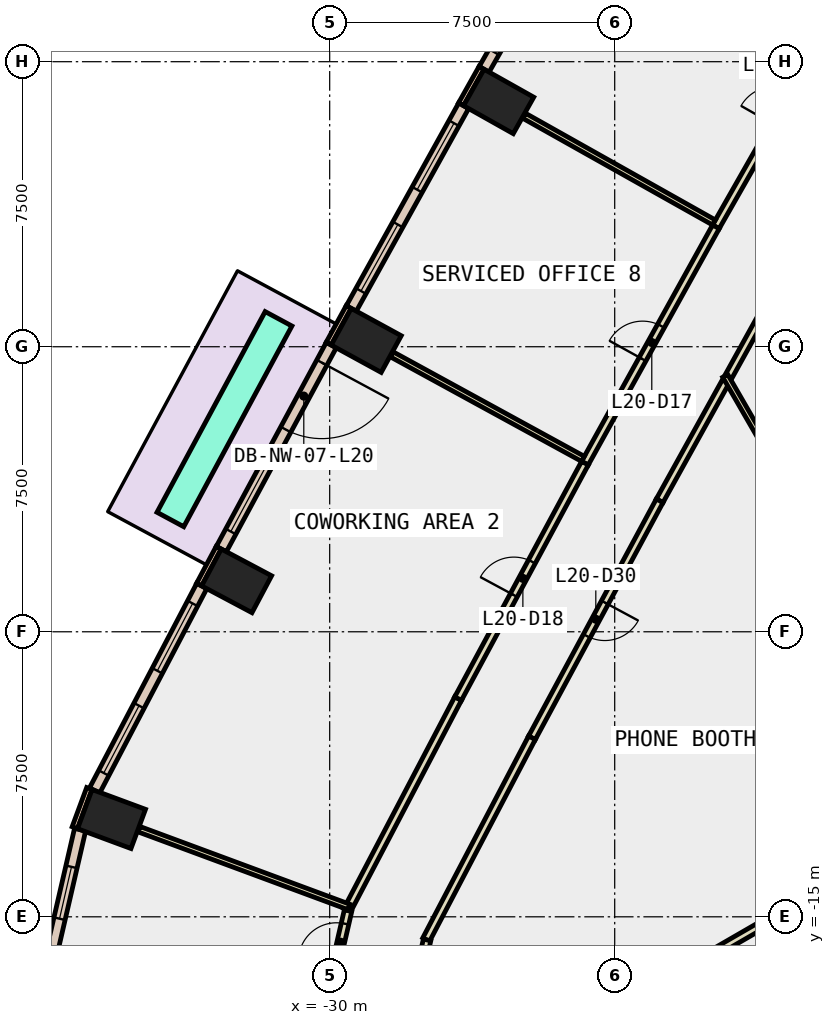
"""IFC4 building model, lengths in metres.
Left out: names, types, materials, properties, quantities, classifications, styles, units other than length and angle.
Written with IfcOpenShell. Run it as: python <this file> out.ifc"""

import sys

from ifc_helpers import new_model, si_unit, direction, frame, frame_2d, origin, origin_2d, place, context, subcontext, project, spatial, rectangle, extrude, element, fill, save


model = new_model("IFC4")
c1 = context("Model", 3, precision=1e-05, world=origin(), true_north=direction((0.0, 1.0)))
c2 = subcontext(c1, "Body", "Model", "MODEL_VIEW")
j1 = project(units=[si_unit("LENGTHUNIT", "METRE"), si_unit("PLANEANGLEUNIT", "RADIAN")], contexts=[c1])
p1 = place(None, origin())
s1 = spatial("IfcSite", under=j1, at=p1, CompositionType="ELEMENT")
p2 = place(p1, origin())
s2 = spatial("IfcBuilding", under=s1, at=p2, CompositionType="ELEMENT")
p3 = place(p2, frame((0.0, 0.0, 95.0)))
s3 = spatial("IfcBuildingStorey", under=s2, at=p3, CompositionType="ELEMENT", Elevation=95.0)
for number, where, z_axis, x_axis in (
    (1, (-25.554, 6.454, -0.4), (0.0, 0.0, 1.0), (0.49, 0.872, 0.0)),
    (2, (-29.039, 0.167, -0.4), (0.0, 0.0, 1.0), (0.48, 0.877, 0.0)),
    (3, (-32.449, -6.16, -0.4), (0.0, 0.0, 1.0), (0.469, 0.883, 0.0)),
    (4, (-35.741, -12.427, -0.4), (0.0, 0.0, 1.0), (0.347, 0.938, 0.0)),
):
    element("IfcColumn", number, at=place(p3, frame(where, z_axis=z_axis, x_axis=x_axis)), inside=s3, PredefinedType="COLUMN", context=c2, shape_type="SweptSolid", body=[
        extrude(rectangle(XDim=1.1, YDim=1.5, at=origin_2d()), origin(), (0.0, 0.0, 1.0), 4.2),
    ])
p4 = place(p3, frame((-26.004, 7.338, 0.0), z_axis=(0.0, 0.0, 1.0), x_axis=(-0.490008344094, -0.871717742574, 0.0)))
e5 = element("IfcWall", 5, at=p4, inside=s3, PredefinedType="STANDARD", context=c2, shape_type="SweptSolid", body=[
    extrude(rectangle(XDim=1.1, YDim=0.15, at=frame_2d((0.55, 0.0))), origin(), (0.0, 0.0, 1.0), 3.8),
])
p5 = place(p3, frame((-29.499, 1.046, 0.0), z_axis=(0.0, 0.0, 1.0), x_axis=(-0.479737645119, -0.877411985247, 0.0)))
e6 = element("IfcWall", 6, at=p5, inside=s3, PredefinedType="STANDARD", context=c2, shape_type="SweptSolid", body=[
    extrude(rectangle(XDim=1.101, YDim=0.15, at=frame_2d((0.55, 0.0))), origin(), (0.0, 0.0, 1.0), 3.8),
])
p6 = place(p3, frame((-32.92, -5.288, 0.0), z_axis=(0.0, 0.0, 1.0), x_axis=(-0.469366248657, -0.883003581319, 0.0)))
e7 = element("IfcWall", 7, at=p6, inside=s3, PredefinedType="STANDARD", context=c2, shape_type="SweptSolid", body=[
    extrude(rectangle(XDim=1.1, YDim=0.15, at=frame_2d((0.55, 0.0))), origin(), (0.0, 0.0, 1.0), 3.8),
])
p7 = place(p3, frame((-36.324, -11.624, 0.0), z_axis=(0.0, 0.0, 1.0), x_axis=(-0.347205967468, -0.937788897436, 0.0)))
e8 = element("IfcWall", 8, at=p7, inside=s3, PredefinedType="STANDARD", context=c2, shape_type="SweptSolid", body=[
    extrude(rectangle(XDim=1.1, YDim=0.15, at=frame_2d((0.55, 0.0))), origin(), (0.0, 0.0, 1.0), 3.8),
])
p8 = place(p3, frame((-22.918, 12.598, 0.0), z_axis=(0.0, 0.0, 1.0), x_axis=(-0.49492259535, -0.868937065967, 0.0)))
e9 = element("IfcWall", 9, at=p8, inside=s3, PredefinedType="STANDARD", context=c2, shape_type="SweptSolid", body=[
    extrude(rectangle(XDim=6.098, YDim=0.3, at=frame_2d((3.049, 0.0))), origin(), (0.0, 0.0, 1.0), 3.8),
])
p9 = place(p8, frame((0.525, 0.0, 0.9)))
e10 = element("IfcOpeningElement", 10, at=p9, cuts=e9, PredefinedType="OPENING", context=c2, shape_type="SweptSolid", body=[
    extrude(rectangle(XDim=2.0, YDim=2.6, at=frame_2d((1.0, 1.3))), frame((0.0, 0.16, 0.0), z_axis=(0.0, -1.0, 0.0), x_axis=(1.0, 0.0, 0.0)), (0.0, 0.0, 1.0), 0.32),
])
p10 = place(p8, frame((3.574, 0.0, 0.9)))
e11 = element("IfcOpeningElement", 11, at=p10, cuts=e9, PredefinedType="OPENING", context=c2, shape_type="SweptSolid", body=[
    extrude(rectangle(XDim=2.0, YDim=2.6, at=frame_2d((1.0, 1.3))), frame((0.0, 0.16, 0.0), z_axis=(0.0, -1.0, 0.0), x_axis=(1.0, 0.0, 0.0)), (0.0, 0.0, 1.0), 0.32),
])
p11 = place(p3, frame((-26.474, 6.341, 0.0), z_axis=(0.0, 0.0, 1.0), x_axis=(-0.484823579315, -0.874611969356, 0.0)))
e12 = element("IfcWall", 12, at=p11, inside=s3, PredefinedType="STANDARD", context=c2, shape_type="SweptSolid", body=[
    extrude(rectangle(XDim=6.099, YDim=0.3, at=frame_2d((3.049, 0.0))), origin(), (0.0, 0.0, 1.0), 3.8),
])
p12 = place(p11, frame((0.525, 0.0, 0.9)))
e13 = element("IfcOpeningElement", 13, at=p12, cuts=e12, PredefinedType="OPENING", context=c2, shape_type="SweptSolid", body=[
    extrude(rectangle(XDim=2.0, YDim=2.6, at=frame_2d((1.0, 1.3))), frame((0.0, 0.16, 0.0), z_axis=(0.0, -1.0, 0.0), x_axis=(1.0, 0.0, 0.0)), (0.0, 0.0, 1.0), 0.32),
])
p13 = place(p11, frame((3.574, 0.0, 0.9)))
e14 = element("IfcOpeningElement", 14, at=p13, cuts=e12, PredefinedType="OPENING", context=c2, shape_type="SweptSolid", body=[
    extrude(rectangle(XDim=2.0, YDim=2.6, at=frame_2d((1.0, 1.3))), frame((0.0, 0.16, 0.0), z_axis=(0.0, -1.0, 0.0), x_axis=(1.0, 0.0, 0.0)), (0.0, 0.0, 1.0), 0.32),
])
p14 = place(p3, frame((-29.958, 0.044, 0.0), z_axis=(0.0, 0.0, 1.0), x_axis=(-0.474369552216, -0.880325807829, 0.0)))
e15 = element("IfcWall", 15, at=p14, inside=s3, PredefinedType="STANDARD", context=c2, shape_type="SweptSolid", body=[
    extrude(rectangle(XDim=6.099, YDim=0.3, at=frame_2d((3.049, 0.0))), origin(), (0.0, 0.0, 1.0), 3.8),
])
p15 = place(p14, frame((0.525, 0.0, 0.0)))
e16 = element("IfcOpeningElement", 16, at=p15, cuts=e15, PredefinedType="OPENING", context=c2, shape_type="SweptSolid", body=[
    extrude(rectangle(XDim=2.0, YDim=2.4, at=frame_2d((1.0, 1.2))), frame((0.0, 0.16, 0.0), z_axis=(0.0, -1.0, 0.0), x_axis=(1.0, 0.0, 0.0)), (0.0, 0.0, 1.0), 0.32),
])
p16 = place(p14, frame((3.574, 0.0, 0.9)))
e17 = element("IfcOpeningElement", 17, at=p16, cuts=e15, PredefinedType="OPENING", context=c2, shape_type="SweptSolid", body=[
    extrude(rectangle(XDim=2.0, YDim=2.6, at=frame_2d((1.0, 1.3))), frame((0.0, 0.16, 0.0), z_axis=(0.0, -1.0, 0.0), x_axis=(1.0, 0.0, 0.0)), (0.0, 0.0, 1.0), 0.32),
])
p17 = place(p3, frame((-33.366, -6.295, 0.0), z_axis=(0.0, 0.0, 1.0), x_axis=(-0.464187178015, -0.885737130173, 0.0)))
e18 = element("IfcWall", 18, at=p17, inside=s3, PredefinedType="STANDARD", context=c2, shape_type="SweptSolid", body=[
    extrude(rectangle(XDim=6.075, YDim=0.3, at=frame_2d((3.038, 0.0))), origin(), (0.0, 0.0, 1.0), 3.8),
])
p18 = place(p17, frame((0.519, 0.0, 0.9)))
e19 = element("IfcOpeningElement", 19, at=p18, cuts=e18, PredefinedType="OPENING", context=c2, shape_type="SweptSolid", body=[
    extrude(rectangle(XDim=2.0, YDim=2.6, at=frame_2d((1.0, 1.3))), frame((0.0, 0.16, 0.0), z_axis=(0.0, -1.0, 0.0), x_axis=(1.0, 0.0, 0.0)), (0.0, 0.0, 1.0), 0.32),
])
p19 = place(p17, frame((3.556, 0.0, 0.9)))
e20 = element("IfcOpeningElement", 20, at=p19, cuts=e18, PredefinedType="OPENING", context=c2, shape_type="SweptSolid", body=[
    extrude(rectangle(XDim=2.0, YDim=2.6, at=frame_2d((1.0, 1.3))), frame((0.0, 0.16, 0.0), z_axis=(0.0, -1.0, 0.0), x_axis=(1.0, 0.0, 0.0)), (0.0, 0.0, 1.0), 0.32),
])
p20 = place(p3, frame((-36.568, -12.706, 0.0), z_axis=(0.0, 0.0, 1.0), x_axis=(-0.224859506699, -0.974391195695, 0.0)))
e21 = element("IfcWall", 21, at=p20, inside=s3, PredefinedType="STANDARD", context=c2, shape_type="SweptSolid", body=[
    extrude(rectangle(XDim=3.41, YDim=0.3, at=frame_2d((1.705, 0.0))), origin(), (0.0, 0.0, 1.0), 3.8),
])
p21 = place(p20, frame((1.005, 0.0, 0.9)))
e22 = element("IfcOpeningElement", 22, at=p21, cuts=e21, PredefinedType="OPENING", context=c2, shape_type="SweptSolid", body=[
    extrude(rectangle(XDim=1.4, YDim=2.6, at=frame_2d((0.7, 1.3))), frame((0.0, 0.16, 0.0), z_axis=(0.0, -1.0, 0.0), x_axis=(1.0, 0.0, 0.0)), (0.0, 0.0, 1.0), 0.32),
])
p22 = place(p3, frame((-31.346, 0.735, 0.0), z_axis=(0.0, 0.0, 1.0), x_axis=(-0.474400726458, -0.880309008665, 0.0)))
e23 = element("IfcWall", 23, at=p22, inside=s3, PredefinedType="STANDARD", context=c2, shape_type="SweptSolid", body=[
    extrude(rectangle(XDim=5.999, YDim=0.8, at=frame_2d((3.0, 0.0))), origin(), (0.0, 0.0, 1.0), 0.8),
])
p23 = place(p3, frame((-17.883, 2.143, 0.0), z_axis=(0.0, 0.0, 1.0), x_axis=(-0.484695523805, -0.874682942101, 0.0)))
e24 = element("IfcWall", 24, at=p23, inside=s3, PredefinedType="PARTITIONING", context=c2, shape_type="SweptSolid", body=[
    extrude(rectangle(XDim=3.349, YDim=0.2, at=frame_2d((1.674, 0.0))), origin(), (0.0, 0.0, 1.0), 3.8),
])
p24 = place(p3, frame((-19.579, -0.917, 0.0), z_axis=(0.0, 0.0, 1.0), x_axis=(-0.484700239797, -0.874680328772, 0.0)))
e25 = element("IfcWall", 25, at=p24, inside=s3, PredefinedType="PARTITIONING", context=c2, shape_type="SweptSolid", body=[
    extrude(rectangle(XDim=3.585, YDim=0.2, at=frame_2d((1.792, 0.0))), origin(), (0.0, 0.0, 1.0), 3.8),
])
p25 = place(p3, frame((-21.317, -4.053, 0.0), z_axis=(0.0, 0.0, 1.0), x_axis=(-0.474391588657, -0.880313932987, 0.0)))
e26 = element("IfcWall", 26, at=p25, inside=s3, PredefinedType="PARTITIONING", context=c2, shape_type="SweptSolid", body=[
    extrude(rectangle(XDim=7.085, YDim=0.2, at=frame_2d((3.542, 0.0))), origin(), (0.0, 0.0, 1.0), 3.8),
])
p26 = place(p25, frame((3.042, 0.0, 0.0)))
e27 = element("IfcOpeningElement", 27, at=p26, cuts=e26, PredefinedType="OPENING", context=c2, shape_type="SweptSolid", body=[
    extrude(rectangle(XDim=1.0, YDim=2.1, at=frame_2d((0.5, 1.05))), frame((0.0, 0.11, 0.0), z_axis=(0.0, -1.0, 0.0), x_axis=(1.0, 0.0, 0.0)), (0.0, 0.0, 1.0), 0.22),
])
p27 = place(p3, frame((-24.678, -10.29, 0.0), z_axis=(0.0, 0.0, 1.0), x_axis=(-0.464203280494, -0.885728691179, 0.0)))
e28 = element("IfcWall", 28, at=p27, inside=s3, PredefinedType="PARTITIONING", context=c2, shape_type="SweptSolid", body=[
    extrude(rectangle(XDim=5.995, YDim=0.2, at=frame_2d((2.998, 0.0))), origin(), (0.0, 0.0, 1.0), 3.8),
])
p28 = place(p3, frame((-27.437, -15.609, 0.0), z_axis=(0.0, 0.0, 1.0), x_axis=(-0.224098195188, -0.97456656977, 0.0)))
e29 = element("IfcWall", 29, at=p28, inside=s3, PredefinedType="PARTITIONING", context=c2, shape_type="SweptSolid", body=[
    extrude(rectangle(XDim=0.375, YDim=0.2, at=frame_2d((0.188, 0.0))), origin(), (0.0, 0.0, 1.0), 3.8),
])
p29 = place(p3, frame((-19.838, 3.156, 0.0), z_axis=(0.0, 0.0, 1.0), x_axis=(0.494978648769, 0.868905137091, 0.0)))
e30 = element("IfcWall", 30, at=p29, inside=s3, PredefinedType="PARTITIONING", context=c2, shape_type="SweptSolid", body=[
    extrude(rectangle(XDim=7.186, YDim=0.2, at=frame_2d((3.593, 0.0))), origin(), (0.0, 0.0, 1.0), 3.8),
])
p30 = place(p29, frame((3.093, 0.0, 0.0)))
e31 = element("IfcOpeningElement", 31, at=p30, cuts=e30, PredefinedType="OPENING", context=c2, shape_type="SweptSolid", body=[
    extrude(rectangle(XDim=1.0, YDim=2.1, at=frame_2d((0.5, 1.05))), frame((0.0, 0.11, 0.0), z_axis=(0.0, -1.0, 0.0), x_axis=(1.0, 0.0, 0.0)), (0.0, 0.0, 1.0), 0.22),
])
p31 = place(p3, frame((-23.284, -3.064, 0.0), z_axis=(0.0, 0.0, 1.0), x_axis=(0.48478560119, 0.874633020689, 0.0)))
e32 = element("IfcWall", 32, at=p31, inside=s3, PredefinedType="PARTITIONING", context=c2, shape_type="SweptSolid", body=[
    extrude(rectangle(XDim=7.11, YDim=0.2, at=frame_2d((3.555, 0.0))), origin(), (0.0, 0.0, 1.0), 3.8),
])
p32 = place(p31, frame((3.13, 0.0, 0.0)))
e33 = element("IfcOpeningElement", 33, at=p32, cuts=e32, PredefinedType="OPENING", context=c2, shape_type="SweptSolid", body=[
    extrude(rectangle(XDim=1.0, YDim=2.1, at=frame_2d((0.5, 1.05))), frame((0.0, 0.11, 0.0), z_axis=(0.0, -1.0, 0.0), x_axis=(1.0, 0.0, 0.0)), (0.0, 0.0, 1.0), 0.22),
])
p33 = place(p3, frame((-29.541, -14.829, 0.0), z_axis=(0.0, 0.0, 1.0), x_axis=(0.46422598759, 0.885716790202, 0.0)))
e34 = element("IfcWall", 34, at=p33, inside=s3, PredefinedType="PARTITIONING", context=c2, shape_type="SweptSolid", body=[
    extrude(rectangle(XDim=6.29, YDim=0.2, at=frame_2d((3.145, 0.0))), origin(), (0.0, 0.0, 1.0), 3.8),
])
p34 = place(p3, frame((-26.621, -9.258, 0.0), z_axis=(0.0, 0.0, 1.0), x_axis=(0.474414295505, 0.880301696136, 0.0)))
e35 = element("IfcWall", 35, at=p34, inside=s3, PredefinedType="PARTITIONING", context=c2, shape_type="SweptSolid", body=[
    extrude(rectangle(XDim=7.036, YDim=0.2, at=frame_2d((3.518, 0.0))), origin(), (0.0, 0.0, 1.0), 3.8),
])
p35 = place(p34, frame((3.093, 0.0, 0.0)))
e36 = element("IfcOpeningElement", 36, at=p35, cuts=e35, PredefinedType="OPENING", context=c2, shape_type="SweptSolid", body=[
    extrude(rectangle(XDim=1.0, YDim=2.1, at=frame_2d((0.5, 1.05))), frame((0.0, 0.11, 0.0), z_axis=(0.0, -1.0, 0.0), x_axis=(1.0, 0.0, 0.0)), (0.0, 0.0, 1.0), 0.22),
])
p36 = place(p3, frame((-29.9, -16.501, 0.0), z_axis=(0.0, 0.0, 1.0), x_axis=(0.224316169854, 0.974516421587, 0.0)))
e37 = element("IfcWall", 37, at=p36, inside=s3, PredefinedType="PARTITIONING", context=c2, shape_type="SweptSolid", body=[
    extrude(rectangle(XDim=1.707, YDim=0.2, at=frame_2d((0.853, 0.0))), origin(), (0.0, 0.0, 1.0), 3.8),
])
p37 = place(p36, frame((0.353, 0.0, 0.0)))
e38 = element("IfcOpeningElement", 38, at=p37, cuts=e37, PredefinedType="OPENING", context=c2, shape_type="SweptSolid", body=[
    extrude(rectangle(XDim=1.0, YDim=2.1, at=frame_2d((0.5, 1.05))), frame((0.0, 0.11, 0.0), z_axis=(0.0, -1.0, 0.0), x_axis=(1.0, 0.0, 0.0)), (0.0, 0.0, 1.0), 0.22),
])
p38 = place(p3, frame((-13.072, -12.009, 0.0), z_axis=(0.0, 0.0, 1.0), x_axis=(-0.865993734772, -0.500054848326, 0.0)))
e39 = element("IfcWall", 39, at=p38, inside=s3, PredefinedType="PARTITIONING", context=c2, shape_type="SweptSolid", body=[
    extrude(rectangle(XDim=8.583, YDim=0.2, at=frame_2d((4.292, 0.0))), origin(), (0.0, 0.0, 1.0), 3.8),
])
p39 = place(p3, frame((-19.888, 3.27, 0.0), z_axis=(0.0, 0.0, 1.0), x_axis=(-0.871789386467, 0.489880868828, 0.0)))
e40 = element("IfcWall", 40, at=p39, inside=s3, PredefinedType="PARTITIONING", context=c2, shape_type="SweptSolid", body=[
    extrude(rectangle(XDim=5.73, YDim=0.15, at=frame_2d((2.865, 0.0))), origin(), (0.0, 0.0, 1.0), 3.8),
])
p40 = place(p3, frame((-23.336, -2.95, 0.0), z_axis=(0.0, 0.0, 1.0), x_axis=(-0.877455496162, 0.479658057637, 0.0)))
e41 = element("IfcWall", 41, at=p40, inside=s3, PredefinedType="PARTITIONING", context=c2, shape_type="SweptSolid", body=[
    extrude(rectangle(XDim=5.729, YDim=0.15, at=frame_2d((2.865, 0.0))), origin(), (0.0, 0.0, 1.0), 3.8),
])
p41 = place(p3, frame((-29.494, -14.741, 0.0), z_axis=(0.0, 0.0, 1.0), x_axis=(-0.937719767819, 0.347392626636, 0.0)))
e42 = element("IfcWall", 42, at=p41, inside=s3, PredefinedType="PARTITIONING", context=c2, shape_type="SweptSolid", body=[
    extrude(rectangle(XDim=5.892, YDim=0.15, at=frame_2d((2.946, 0.0))), origin(), (0.0, 0.0, 1.0), 3.8),
])
p42 = place(p3, frame((-15.225, -8.328, 0.0), z_axis=(0.0, 0.0, 1.0), x_axis=(-0.500038648455, 0.866003088939, 0.0)))
e43 = element("IfcWall", 43, at=p42, inside=s3, PredefinedType="PARTITIONING", context=c2, shape_type="SweptSolid", body=[
    extrude(rectangle(XDim=8.733, YDim=0.15, at=frame_2d((4.367, 0.0))), origin(), (0.0, 0.0, 1.0), 3.8),
])
p43 = place(p10, origin())
e44 = element("IfcWindow", 44, at=p43, inside=s3, PartitioningType="SINGLE_PANEL", PredefinedType="WINDOW", context=c2, shape_type="SweptSolid", body=[
    extrude(rectangle(XDim=2.0, YDim=2.6, at=frame_2d((1.0, 1.3))), frame((0.0, 0.03, 0.0), z_axis=(0.0, -1.0, 0.0), x_axis=(1.0, 0.0, 0.0)), (0.0, 0.0, 1.0), 0.06),
])
fill(e11, e44)
p44 = place(p12, origin())
e45 = element("IfcWindow", 45, at=p44, inside=s3, PartitioningType="SINGLE_PANEL", PredefinedType="WINDOW", context=c2, shape_type="SweptSolid", body=[
    extrude(rectangle(XDim=2.0, YDim=2.6, at=frame_2d((1.0, 1.3))), frame((0.0, 0.03, 0.0), z_axis=(0.0, -1.0, 0.0), x_axis=(1.0, 0.0, 0.0)), (0.0, 0.0, 1.0), 0.06),
])
fill(e13, e45)
p45 = place(p13, origin())
e46 = element("IfcWindow", 46, at=p45, inside=s3, PartitioningType="SINGLE_PANEL", PredefinedType="WINDOW", context=c2, shape_type="SweptSolid", body=[
    extrude(rectangle(XDim=2.0, YDim=2.6, at=frame_2d((1.0, 1.3))), frame((0.0, 0.03, 0.0), z_axis=(0.0, -1.0, 0.0), x_axis=(1.0, 0.0, 0.0)), (0.0, 0.0, 1.0), 0.06),
])
fill(e14, e46)
p46 = place(p15, origin())
e47 = element("IfcDoor", 47, at=p46, inside=s3, OperationType="SLIDING_TO_LEFT", PredefinedType="DOOR", context=c2, shape_type="SweptSolid", body=[
    extrude(rectangle(XDim=2.0, YDim=2.4, at=frame_2d((1.0, 1.2))), frame((0.0, 0.025, 0.0), z_axis=(0.0, -1.0, 0.0), x_axis=(1.0, 0.0, 0.0)), (0.0, 0.0, 1.0), 0.05),
])
fill(e16, e47)
p47 = place(p16, origin())
e48 = element("IfcWindow", 48, at=p47, inside=s3, PartitioningType="SINGLE_PANEL", PredefinedType="WINDOW", context=c2, shape_type="SweptSolid", body=[
    extrude(rectangle(XDim=2.0, YDim=2.6, at=frame_2d((1.0, 1.3))), frame((0.0, 0.03, 0.0), z_axis=(0.0, -1.0, 0.0), x_axis=(1.0, 0.0, 0.0)), (0.0, 0.0, 1.0), 0.06),
])
fill(e17, e48)
p48 = place(p18, origin())
e49 = element("IfcWindow", 49, at=p48, inside=s3, PartitioningType="SINGLE_PANEL", PredefinedType="WINDOW", context=c2, shape_type="SweptSolid", body=[
    extrude(rectangle(XDim=2.0, YDim=2.6, at=frame_2d((1.0, 1.3))), frame((0.0, 0.03, 0.0), z_axis=(0.0, -1.0, 0.0), x_axis=(1.0, 0.0, 0.0)), (0.0, 0.0, 1.0), 0.06),
])
fill(e19, e49)
p49 = place(p19, origin())
e50 = element("IfcWindow", 50, at=p49, inside=s3, PartitioningType="SINGLE_PANEL", PredefinedType="WINDOW", context=c2, shape_type="SweptSolid", body=[
    extrude(rectangle(XDim=2.0, YDim=2.6, at=frame_2d((1.0, 1.3))), frame((0.0, 0.03, 0.0), z_axis=(0.0, -1.0, 0.0), x_axis=(1.0, 0.0, 0.0)), (0.0, 0.0, 1.0), 0.06),
])
fill(e20, e50)
p50 = place(p21, origin())
e51 = element("IfcWindow", 51, at=p50, inside=s3, PartitioningType="SINGLE_PANEL", PredefinedType="WINDOW", context=c2, shape_type="SweptSolid", body=[
    extrude(rectangle(XDim=1.4, YDim=2.6, at=frame_2d((0.7, 1.3))), frame((0.0, 0.03, 0.0), z_axis=(0.0, -1.0, 0.0), x_axis=(1.0, 0.0, 0.0)), (0.0, 0.0, 1.0), 0.06),
])
fill(e22, e51)
p51 = place(p32, origin())
e52 = element("IfcDoor", 52, at=p51, inside=s3, OperationType="SINGLE_SWING_LEFT", PredefinedType="DOOR", context=c2, shape_type="SweptSolid", body=[
    extrude(rectangle(XDim=1.0, YDim=2.1, at=frame_2d((0.5, 1.05))), frame((0.0, 0.025, 0.0), z_axis=(0.0, -1.0, 0.0), x_axis=(1.0, 0.0, 0.0)), (0.0, 0.0, 1.0), 0.05),
])
fill(e33, e52)
p52 = place(p35, origin())
e53 = element("IfcDoor", 53, at=p52, inside=s3, OperationType="SINGLE_SWING_LEFT", PredefinedType="DOOR", context=c2, shape_type="SweptSolid", body=[
    extrude(rectangle(XDim=1.0, YDim=2.1, at=frame_2d((0.5, 1.05))), frame((0.0, 0.025, 0.0), z_axis=(0.0, -1.0, 0.0), x_axis=(1.0, 0.0, 0.0)), (0.0, 0.0, 1.0), 0.05),
])
fill(e36, e53)
p53 = place(p37, origin())
e54 = element("IfcDoor", 54, at=p53, inside=s3, OperationType="SINGLE_SWING_RIGHT", PredefinedType="DOOR", context=c2, shape_type="SweptSolid", body=[
    extrude(rectangle(XDim=1.0, YDim=2.1, at=frame_2d((0.5, 1.05))), frame((0.0, 0.025, 0.0), z_axis=(0.0, -1.0, 0.0), x_axis=(1.0, 0.0, 0.0)), (0.0, 0.0, 1.0), 0.05),
])
fill(e38, e54)
p54 = place(p26, origin())
e55 = element("IfcDoor", 55, at=p54, inside=s3, OperationType="SINGLE_SWING_RIGHT", PredefinedType="DOOR", context=c2, shape_type="SweptSolid", body=[
    extrude(rectangle(XDim=1.0, YDim=2.1, at=frame_2d((0.5, 1.05))), frame((0.0, 0.025, 0.0), z_axis=(0.0, -1.0, 0.0), x_axis=(1.0, 0.0, 0.0)), (0.0, 0.0, 1.0), 0.05),
])
fill(e27, e55)
save(model, sys.argv[1])
